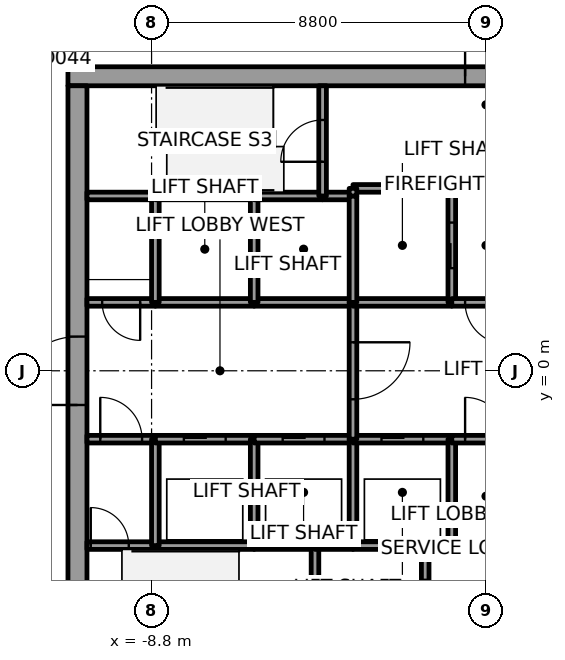
"""IFC4 building model, lengths in metres.
Left out: names, types, materials, properties, quantities, classifications, styles, units other than length and angle.
Written with IfcOpenShell. Run it as: python <this file> out.ifc"""

import sys

from ifc_helpers import new_model, si_unit, direction, frame, frame_2d, origin, place, context, subcontext, project, spatial, rectangle, extrude, element, fill, save


model = new_model("IFC4")
c1 = context("Model", 3, precision=1e-05, world=origin(), true_north=direction((0.0, 1.0)))
c2 = subcontext(c1, "Body", "Model", "MODEL_VIEW")
j1 = project(units=[si_unit("LENGTHUNIT", "METRE"), si_unit("PLANEANGLEUNIT", "RADIAN")], contexts=[c1])
p1 = place(None, origin())
s1 = spatial("IfcSite", under=j1, at=p1, CompositionType="ELEMENT")
p2 = place(p1, origin())
s2 = spatial("IfcBuilding", under=s1, at=p2, CompositionType="ELEMENT")
p3 = place(p2, frame((0.0, 0.0, 73.9)))
s3 = spatial("IfcBuildingStorey", under=s2, at=p3, CompositionType="ELEMENT", Elevation=73.9)
p4 = place(p3, frame((-11.0, 7.75, 0.0), z_axis=(0.0, 0.0, 1.0), x_axis=(1.0, 0.0, 0.0)))
e1 = element("IfcWall", 1, at=p4, inside=s3, PredefinedType="SHEAR", context=c2, shape_type="SweptSolid", body=[
    extrude(rectangle(XDim=22.0, YDim=0.5, at=frame_2d((11.0, 0.0))), origin(), (0.0, 0.0, 1.0), 3.7),
])
p5 = place(p4, frame((10.45, 0.0, 0.0)))
e2 = element("IfcOpeningElement", 2, at=p5, cuts=e1, PredefinedType="OPENING", context=c2, shape_type="SweptSolid", body=[
    extrude(rectangle(XDim=1.1, YDim=2.1, at=frame_2d((0.55, 1.05))), frame((0.0, 0.25, 0.0), z_axis=(0.0, -1.0, 0.0), x_axis=(1.0, 0.0, 0.0)), (0.0, 0.0, 1.0), 0.5),
])
p6 = place(p3, frame((-10.75, -7.5, 0.0), z_axis=(0.0, 0.0, 1.0), x_axis=(0.0, 1.0, 0.0)))
e3 = element("IfcWall", 3, at=p6, inside=s3, PredefinedType="SHEAR", context=c2, shape_type="SweptSolid", body=[
    extrude(rectangle(XDim=15.0, YDim=0.5, at=frame_2d((7.5, 0.0))), origin(), (0.0, 0.0, 1.0), 3.7),
])
p7 = place(p6, frame((6.6, 0.0, 0.0)))
e4 = element("IfcOpeningElement", 4, at=p7, cuts=e3, PredefinedType="OPENING", context=c2, shape_type="SweptSolid", body=[
    extrude(rectangle(XDim=1.8, YDim=2.1, at=frame_2d((0.9, 1.05))), frame((0.0, 0.25, 0.0), z_axis=(0.0, -1.0, 0.0), x_axis=(1.0, 0.0, 0.0)), (0.0, 0.0, 1.0), 0.5),
])
p8 = place(p3, frame((-10.5, -4.6, 0.0), z_axis=(0.0, 0.0, 1.0), x_axis=(1.0, 0.0, 0.0)))
e5 = element("IfcWall", 5, at=p8, inside=s3, PredefinedType="SOLIDWALL", context=c2, shape_type="SweptSolid", body=[
    extrude(rectangle(XDim=1.8, YDim=0.2, at=frame_2d((0.9, 0.0))), origin(), (0.0, 0.0, 1.0), 3.55),
])
p9 = place(p8, frame((0.1, 0.0, 0.0)))
e6 = element("IfcOpeningElement", 6, at=p9, cuts=e5, PredefinedType="OPENING", context=c2, shape_type="SweptSolid", body=[
    extrude(rectangle(XDim=1.0, YDim=2.1, at=frame_2d((0.5, 1.05))), frame((0.0, 0.1, 0.0), z_axis=(0.0, -1.0, 0.0), x_axis=(1.0, 0.0, 0.0)), (0.0, 0.0, 1.0), 0.2),
])
p10 = place(p3, frame((-10.5, -1.8, 0.0), z_axis=(0.0, 0.0, 1.0), x_axis=(1.0, 0.0, 0.0)))
e7 = element("IfcWall", 7, at=p10, inside=s3, PredefinedType="SOLIDWALL", context=c2, shape_type="SweptSolid", body=[
    extrude(rectangle(XDim=1.8, YDim=0.2, at=frame_2d((0.9, 0.0))), origin(), (0.0, 0.0, 1.0), 3.55),
])
p11 = place(p10, frame((0.35, 0.0, 0.0)))
e8 = element("IfcOpeningElement", 8, at=p11, cuts=e7, PredefinedType="OPENING", context=c2, shape_type="SweptSolid", body=[
    extrude(rectangle(XDim=1.1, YDim=2.1, at=frame_2d((0.55, 1.05))), frame((0.0, 0.1, 0.0), z_axis=(0.0, -1.0, 0.0), x_axis=(1.0, 0.0, 0.0)), (0.0, 0.0, 1.0), 0.2),
])
p12 = place(p3, frame((-8.7, 1.8, 0.0), z_axis=(0.0, 0.0, 1.0), x_axis=(-1.0, 0.0, 0.0)))
e9 = element("IfcWall", 9, at=p12, inside=s3, PredefinedType="SOLIDWALL", context=c2, shape_type="SweptSolid", body=[
    extrude(rectangle(XDim=1.8, YDim=0.2, at=frame_2d((0.9, 0.0))), origin(), (0.0, 0.0, 1.0), 3.55),
])
p13 = place(p12, frame((0.4, 0.0, 0.0)))
e10 = element("IfcOpeningElement", 10, at=p13, cuts=e9, PredefinedType="OPENING", context=c2, shape_type="SweptSolid", body=[
    extrude(rectangle(XDim=1.0, YDim=2.1, at=frame_2d((0.5, 1.05))), frame((0.0, 0.1, 0.0), z_axis=(0.0, -1.0, 0.0), x_axis=(1.0, 0.0, 0.0)), (0.0, 0.0, 1.0), 0.2),
])
p14 = place(p3, frame((-8.7, 4.6, 0.0), z_axis=(0.0, 0.0, 1.0), x_axis=(-1.0, 0.0, 0.0)))
e11 = element("IfcWall", 11, at=p14, inside=s3, PredefinedType="SOLIDWALL", context=c2, shape_type="SweptSolid", body=[
    extrude(rectangle(XDim=1.8, YDim=0.2, at=frame_2d((0.9, 0.0))), origin(), (0.0, 0.0, 1.0), 3.55),
])
p15 = place(p3, frame((-8.7, -4.6, 0.0), z_axis=(0.0, 0.0, 1.0), x_axis=(1.0, 0.0, 0.0)))
e12 = element("IfcWall", 12, at=p15, inside=s3, PredefinedType="SOLIDWALL", context=c2, shape_type="SweptSolid", body=[
    extrude(rectangle(XDim=2.6, YDim=0.2, at=frame_2d((1.3, 0.0))), origin(), (0.0, 0.0, 1.0), 3.55),
])
p16 = place(p3, frame((-8.7, -4.6, 0.0), z_axis=(0.0, 0.0, 1.0), x_axis=(0.0, 1.0, 0.0)))
e13 = element("IfcWall", 13, at=p16, inside=s3, PredefinedType="SOLIDWALL", context=c2, shape_type="SweptSolid", body=[
    extrude(rectangle(XDim=2.8, YDim=0.2, at=frame_2d((1.4, 0.0))), origin(), (0.0, 0.0, 1.0), 3.55),
])
p17 = place(p3, frame((-8.7, -1.8, 0.0), z_axis=(0.0, 0.0, 1.0), x_axis=(1.0, 0.0, 0.0)))
e14 = element("IfcWall", 14, at=p17, inside=s3, PredefinedType="SOLIDWALL", context=c2, shape_type="SweptSolid", body=[
    extrude(rectangle(XDim=2.6, YDim=0.2, at=frame_2d((1.3, 0.0))), origin(), (0.0, 0.0, 1.0), 3.55),
])
p18 = place(p17, frame((0.75, 0.0, 0.0)))
e15 = element("IfcOpeningElement", 15, at=p18, cuts=e14, PredefinedType="OPENING", context=c2, shape_type="SweptSolid", body=[
    extrude(rectangle(XDim=1.1, YDim=2.1, at=frame_2d((0.55, 1.05))), frame((0.0, 0.1, 0.0), z_axis=(0.0, -1.0, 0.0), x_axis=(1.0, 0.0, 0.0)), (0.0, 0.0, 1.0), 0.2),
])
p19 = place(p3, frame((-6.1, 1.8, 0.0), z_axis=(0.0, 0.0, 1.0), x_axis=(-1.0, 0.0, 0.0)))
e16 = element("IfcWall", 16, at=p19, inside=s3, PredefinedType="SOLIDWALL", context=c2, shape_type="SweptSolid", body=[
    extrude(rectangle(XDim=2.6, YDim=0.2, at=frame_2d((1.3, 0.0))), origin(), (0.0, 0.0, 1.0), 3.55),
])
p20 = place(p3, frame((-8.7, 1.8, 0.0), z_axis=(0.0, 0.0, 1.0), x_axis=(0.0, 1.0, 0.0)))
e17 = element("IfcWall", 17, at=p20, inside=s3, PredefinedType="SOLIDWALL", context=c2, shape_type="SweptSolid", body=[
    extrude(rectangle(XDim=2.8, YDim=0.2, at=frame_2d((1.4, 0.0))), origin(), (0.0, 0.0, 1.0), 3.55),
])
p21 = place(p3, frame((-6.1, 4.6, 0.0), z_axis=(0.0, 0.0, 1.0), x_axis=(-1.0, 0.0, 0.0)))
e18 = element("IfcWall", 18, at=p21, inside=s3, PredefinedType="SOLIDWALL", context=c2, shape_type="SweptSolid", body=[
    extrude(rectangle(XDim=2.6, YDim=0.2, at=frame_2d((1.3, 0.0))), origin(), (0.0, 0.0, 1.0), 3.55),
])
p22 = place(p3, frame((-6.1, -4.6, 0.0), z_axis=(0.0, 0.0, 1.0), x_axis=(1.0, 0.0, 0.0)))
e19 = element("IfcWall", 19, at=p22, inside=s3, PredefinedType="SOLIDWALL", context=c2, shape_type="SweptSolid", body=[
    extrude(rectangle(XDim=1.6, YDim=0.2, at=frame_2d((0.8, 0.0))), origin(), (0.0, 0.0, 1.0), 3.55),
])
p23 = place(p3, frame((-6.1, -4.6, 0.0), z_axis=(0.0, 0.0, 1.0), x_axis=(0.0, 1.0, 0.0)))
e20 = element("IfcWall", 20, at=p23, inside=s3, PredefinedType="SOLIDWALL", context=c2, shape_type="SweptSolid", body=[
    extrude(rectangle(XDim=2.8, YDim=0.2, at=frame_2d((1.4, 0.0))), origin(), (0.0, 0.0, 1.0), 3.55),
])
p24 = place(p3, frame((-6.1, -1.8, 0.0), z_axis=(0.0, 0.0, 1.0), x_axis=(1.0, 0.0, 0.0)))
e21 = element("IfcWall", 21, at=p24, inside=s3, PredefinedType="SOLIDWALL", context=c2, shape_type="SweptSolid", body=[
    extrude(rectangle(XDim=2.6, YDim=0.2, at=frame_2d((1.3, 0.0))), origin(), (0.0, 0.0, 1.0), 3.55),
])
p25 = place(p24, frame((0.75, 0.0, 0.0)))
e22 = element("IfcOpeningElement", 22, at=p25, cuts=e21, PredefinedType="OPENING", context=c2, shape_type="SweptSolid", body=[
    extrude(rectangle(XDim=1.1, YDim=2.1, at=frame_2d((0.55, 1.05))), frame((0.0, 0.1, 0.0), z_axis=(0.0, -1.0, 0.0), x_axis=(1.0, 0.0, 0.0)), (0.0, 0.0, 1.0), 0.2),
])
p26 = place(p3, frame((-3.5, 1.8, 0.0), z_axis=(0.0, 0.0, 1.0), x_axis=(-1.0, 0.0, 0.0)))
e23 = element("IfcWall", 23, at=p26, inside=s3, PredefinedType="SOLIDWALL", context=c2, shape_type="SweptSolid", body=[
    extrude(rectangle(XDim=2.6, YDim=0.2, at=frame_2d((1.3, 0.0))), origin(), (0.0, 0.0, 1.0), 3.55),
])
p27 = place(p3, frame((-6.1, 1.8, 0.0), z_axis=(0.0, 0.0, 1.0), x_axis=(0.0, 1.0, 0.0)))
e24 = element("IfcWall", 24, at=p27, inside=s3, PredefinedType="SOLIDWALL", context=c2, shape_type="SweptSolid", body=[
    extrude(rectangle(XDim=2.8, YDim=0.2, at=frame_2d((1.4, 0.0))), origin(), (0.0, 0.0, 1.0), 3.55),
])
p28 = place(p3, frame((-4.3, 4.6, 0.0), z_axis=(0.0, 0.0, 1.0), x_axis=(-1.0, 0.0, 0.0)))
e25 = element("IfcWall", 25, at=p28, inside=s3, PredefinedType="SOLIDWALL", context=c2, shape_type="SweptSolid", body=[
    extrude(rectangle(XDim=1.8, YDim=0.2, at=frame_2d((0.9, 0.0))), origin(), (0.0, 0.0, 1.0), 3.55),
])
p29 = place(p3, frame((-4.5, -4.6, 0.0), z_axis=(0.0, 0.0, 1.0), x_axis=(0.0, -1.0, 0.0)))
e26 = element("IfcWall", 26, at=p29, inside=s3, PredefinedType="SOLIDWALL", context=c2, shape_type="SweptSolid", body=[
    extrude(rectangle(XDim=2.9, YDim=0.2, at=frame_2d((1.45, 0.0))), origin(), (0.0, 0.0, 1.0), 3.55),
])
p30 = place(p3, frame((-4.5, -4.6, 0.0), z_axis=(0.0, 0.0, 1.0), x_axis=(1.0, 0.0, 0.0)))
e27 = element("IfcWall", 27, at=p30, inside=s3, PredefinedType="SOLIDWALL", context=c2, shape_type="SweptSolid", body=[
    extrude(rectangle(XDim=1.0, YDim=0.2, at=frame_2d((0.5, 0.0))), origin(), (0.0, 0.0, 1.0), 3.55),
])
p31 = place(p3, frame((-3.5, 4.6, 0.0), z_axis=(0.0, 0.0, 1.0), x_axis=(-1.0, 0.0, 0.0)))
e28 = element("IfcWall", 28, at=p31, inside=s3, PredefinedType="SOLIDWALL", context=c2, shape_type="SweptSolid", body=[
    extrude(rectangle(XDim=0.8, YDim=0.2, at=frame_2d((0.4, 0.0))), origin(), (0.0, 0.0, 1.0), 3.55),
])
p32 = place(p3, frame((-4.3, 4.6, 0.0), z_axis=(0.0, 0.0, 1.0), x_axis=(0.0, 1.0, 0.0)))
e29 = element("IfcWall", 29, at=p32, inside=s3, PredefinedType="SOLIDWALL", context=c2, shape_type="SweptSolid", body=[
    extrude(rectangle(XDim=2.9, YDim=0.2, at=frame_2d((1.45, 0.0))), origin(), (0.0, 0.0, 1.0), 3.55),
])
p33 = place(p32, frame((0.9, 0.0, 0.0)))
e30 = element("IfcOpeningElement", 30, at=p33, cuts=e29, PredefinedType="OPENING", context=c2, shape_type="SweptSolid", body=[
    extrude(rectangle(XDim=1.1, YDim=2.1, at=frame_2d((0.55, 1.05))), frame((0.0, 0.1, 0.0), z_axis=(0.0, -1.0, 0.0), x_axis=(1.0, 0.0, 0.0)), (0.0, 0.0, 1.0), 0.2),
])
p34 = place(p3, frame((-3.5, -4.6, 0.0), z_axis=(0.0, 0.0, 1.0), x_axis=(1.0, 0.0, 0.0)))
e31 = element("IfcWall", 31, at=p34, inside=s3, PredefinedType="SOLIDWALL", context=c2, shape_type="SweptSolid", body=[
    extrude(rectangle(XDim=1.9, YDim=0.2, at=frame_2d((0.95, 0.0))), origin(), (0.0, 0.0, 1.0), 3.55),
])
p35 = place(p3, frame((-3.5, -4.6, 0.0), z_axis=(0.0, 0.0, 1.0), x_axis=(0.0, 1.0, 0.0)))
e32 = element("IfcWall", 32, at=p35, inside=s3, PredefinedType="SOLIDWALL", context=c2, shape_type="SweptSolid", body=[
    extrude(rectangle(XDim=2.8, YDim=0.2, at=frame_2d((1.4, 0.0))), origin(), (0.0, 0.0, 1.0), 3.55),
])
p36 = place(p3, frame((-3.5, -1.8, 0.0), z_axis=(0.0, 0.0, 1.0), x_axis=(1.0, 0.0, 0.0)))
e33 = element("IfcWall", 33, at=p36, inside=s3, PredefinedType="SOLIDWALL", context=c2, shape_type="SweptSolid", body=[
    extrude(rectangle(XDim=2.6, YDim=0.2, at=frame_2d((1.3, 0.0))), origin(), (0.0, 0.0, 1.0), 3.55),
])
p37 = place(p36, frame((0.75, 0.0, 0.0)))
e34 = element("IfcOpeningElement", 34, at=p37, cuts=e33, PredefinedType="OPENING", context=c2, shape_type="SweptSolid", body=[
    extrude(rectangle(XDim=1.1, YDim=2.1, at=frame_2d((0.55, 1.05))), frame((0.0, 0.1, 0.0), z_axis=(0.0, -1.0, 0.0), x_axis=(1.0, 0.0, 0.0)), (0.0, 0.0, 1.0), 0.2),
])
p38 = place(p3, frame((-3.5, 1.8, 0.0), z_axis=(0.0, 0.0, 1.0), x_axis=(0.0, -1.0, 0.0)))
e35 = element("IfcWall", 35, at=p38, inside=s3, PredefinedType="SOLIDWALL", context=c2, shape_type="SweptSolid", body=[
    extrude(rectangle(XDim=3.6, YDim=0.2, at=frame_2d((1.8, 0.0))), origin(), (0.0, 0.0, 1.0), 3.55),
])
p39 = place(p38, frame((1.05, 0.0, 0.0)))
e36 = element("IfcOpeningElement", 36, at=p39, cuts=e35, PredefinedType="OPENING", context=c2, shape_type="SweptSolid", body=[
    extrude(rectangle(XDim=1.5, YDim=2.1, at=frame_2d((0.75, 1.05))), frame((0.0, 0.1, 0.0), z_axis=(0.0, -1.0, 0.0), x_axis=(1.0, 0.0, 0.0)), (0.0, 0.0, 1.0), 0.2),
])
p40 = place(p3, frame((-0.9, 1.8, 0.0), z_axis=(0.0, 0.0, 1.0), x_axis=(-1.0, 0.0, 0.0)))
e37 = element("IfcWall", 37, at=p40, inside=s3, PredefinedType="SOLIDWALL", context=c2, shape_type="SweptSolid", body=[
    extrude(rectangle(XDim=2.6, YDim=0.2, at=frame_2d((1.3, 0.0))), origin(), (0.0, 0.0, 1.0), 3.55),
])
p41 = place(p3, frame((-3.5, 4.6, 0.0), z_axis=(0.0, 0.0, 1.0), x_axis=(0.0, -1.0, 0.0)))
e38 = element("IfcWall", 38, at=p41, inside=s3, PredefinedType="SOLIDWALL", context=c2, shape_type="SweptSolid", body=[
    extrude(rectangle(XDim=2.8, YDim=0.2, at=frame_2d((1.4, 0.0))), origin(), (0.0, 0.0, 1.0), 3.55),
])
p42 = place(p3, frame((-0.9, 1.8, 0.0), z_axis=(0.0, 0.0, 1.0), x_axis=(0.0, 1.0, 0.0)))
e39 = element("IfcWall", 39, at=p42, inside=s3, PredefinedType="SOLIDWALL", context=c2, shape_type="SweptSolid", body=[
    extrude(rectangle(XDim=3.0, YDim=0.2, at=frame_2d((1.5, 0.0))), origin(), (0.0, 0.0, 1.0), 3.55),
])
p43 = place(p42, frame((0.9, 0.0, 0.0)))
e40 = element("IfcOpeningElement", 40, at=p43, cuts=e39, PredefinedType="OPENING", context=c2, shape_type="SweptSolid", body=[
    extrude(rectangle(XDim=1.2, YDim=2.1, at=frame_2d((0.6, 1.05))), frame((0.0, 0.1, 0.0), z_axis=(0.0, -1.0, 0.0), x_axis=(1.0, 0.0, 0.0)), (0.0, 0.0, 1.0), 0.2),
])
p44 = place(p3, frame((-0.9, 4.8, 0.0), z_axis=(0.0, 0.0, 1.0), x_axis=(-1.0, 0.0, 0.0)))
e41 = element("IfcWall", 41, at=p44, inside=s3, PredefinedType="SOLIDWALL", context=c2, shape_type="SweptSolid", body=[
    extrude(rectangle(XDim=2.6, YDim=0.2, at=frame_2d((1.3, 0.0))), origin(), (0.0, 0.0, 1.0), 3.55),
])
p45 = place(p3, frame((-3.5, 4.8, 0.0), z_axis=(0.0, 0.0, 1.0), x_axis=(0.0, -1.0, 0.0)))
e42 = element("IfcWall", 42, at=p45, inside=s3, PredefinedType="SOLIDWALL", context=c2, shape_type="SweptSolid", body=[
    extrude(rectangle(XDim=0.2, YDim=0.2, at=frame_2d((0.1, 0.0))), origin(), (0.0, 0.0, 1.0), 3.55),
])
p46 = place(p3, frame((-1.6, -7.5, 0.0), z_axis=(0.0, 0.0, 1.0), x_axis=(0.0, 1.0, 0.0)))
e43 = element("IfcWall", 43, at=p46, inside=s3, PredefinedType="SOLIDWALL", context=c2, shape_type="SweptSolid", body=[
    extrude(rectangle(XDim=2.9, YDim=0.2, at=frame_2d((1.45, 0.0))), origin(), (0.0, 0.0, 1.0), 3.55),
])
p47 = place(p46, frame((0.9, 0.0, 0.0)))
e44 = element("IfcOpeningElement", 44, at=p47, cuts=e43, PredefinedType="OPENING", context=c2, shape_type="SweptSolid", body=[
    extrude(rectangle(XDim=1.1, YDim=2.1, at=frame_2d((0.55, 1.05))), frame((0.0, 0.1, 0.0), z_axis=(0.0, -1.0, 0.0), x_axis=(1.0, 0.0, 0.0)), (0.0, 0.0, 1.0), 0.2),
])
p48 = place(p3, frame((-1.6, -4.6, 0.0), z_axis=(0.0, 0.0, 1.0), x_axis=(1.0, 0.0, 0.0)))
e45 = element("IfcWall", 45, at=p48, inside=s3, PredefinedType="SOLIDWALL", context=c2, shape_type="SweptSolid", body=[
    extrude(rectangle(XDim=0.7, YDim=0.2, at=frame_2d((0.35, 0.0))), origin(), (0.0, 0.0, 1.0), 3.55),
])
p49 = place(p3, frame((-0.9, -4.6, 0.0), z_axis=(0.0, 0.0, 1.0), x_axis=(0.0, 1.0, 0.0)))
e46 = element("IfcWall", 46, at=p49, inside=s3, PredefinedType="SOLIDWALL", context=c2, shape_type="SweptSolid", body=[
    extrude(rectangle(XDim=2.8, YDim=0.2, at=frame_2d((1.4, 0.0))), origin(), (0.0, 0.0, 1.0), 3.55),
])
p50 = place(p3, frame((-0.9, -1.8, 0.0), z_axis=(0.0, 0.0, 1.0), x_axis=(1.0, 0.0, 0.0)))
e47 = element("IfcWall", 47, at=p50, inside=s3, PredefinedType="SOLIDWALL", context=c2, shape_type="SweptSolid", body=[
    extrude(rectangle(XDim=1.8, YDim=0.2, at=frame_2d((0.9, 0.0))), origin(), (0.0, 0.0, 1.0), 3.55),
])
p51 = place(p50, frame((0.35, 0.0, 0.0)))
e48 = element("IfcOpeningElement", 48, at=p51, cuts=e47, PredefinedType="OPENING", context=c2, shape_type="SweptSolid", body=[
    extrude(rectangle(XDim=1.1, YDim=2.1, at=frame_2d((0.55, 1.05))), frame((0.0, 0.1, 0.0), z_axis=(0.0, -1.0, 0.0), x_axis=(1.0, 0.0, 0.0)), (0.0, 0.0, 1.0), 0.2),
])
p52 = place(p3, frame((0.9, 1.8, 0.0), z_axis=(0.0, 0.0, 1.0), x_axis=(-1.0, 0.0, 0.0)))
e49 = element("IfcWall", 49, at=p52, inside=s3, PredefinedType="SOLIDWALL", context=c2, shape_type="SweptSolid", body=[
    extrude(rectangle(XDim=1.8, YDim=0.2, at=frame_2d((0.9, 0.0))), origin(), (0.0, 0.0, 1.0), 3.55),
])
p53 = place(p52, frame((0.35, 0.0, 0.0)))
e50 = element("IfcOpeningElement", 50, at=p53, cuts=e49, PredefinedType="OPENING", context=c2, shape_type="SweptSolid", body=[
    extrude(rectangle(XDim=1.1, YDim=2.1, at=frame_2d((0.55, 1.05))), frame((0.0, 0.1, 0.0), z_axis=(0.0, -1.0, 0.0), x_axis=(1.0, 0.0, 0.0)), (0.0, 0.0, 1.0), 0.2),
])
p54 = place(p18, origin())
e51 = element("IfcDoor", 51, at=p54, inside=s3, OperationType="SLIDING_TO_LEFT", PredefinedType="DOOR", context=c2, shape_type="SweptSolid", body=[
    extrude(rectangle(XDim=1.1, YDim=2.1, at=frame_2d((0.55, 1.05))), frame((0.0, 0.025, 0.0), z_axis=(0.0, -1.0, 0.0), x_axis=(1.0, 0.0, 0.0)), (0.0, 0.0, 1.0), 0.05),
])
fill(e15, e51)
p55 = place(p25, origin())
e52 = element("IfcDoor", 52, at=p55, inside=s3, OperationType="SLIDING_TO_LEFT", PredefinedType="DOOR", context=c2, shape_type="SweptSolid", body=[
    extrude(rectangle(XDim=1.1, YDim=2.1, at=frame_2d((0.55, 1.05))), frame((0.0, 0.025, 0.0), z_axis=(0.0, -1.0, 0.0), x_axis=(1.0, 0.0, 0.0)), (0.0, 0.0, 1.0), 0.05),
])
fill(e22, e52)
p56 = place(p37, origin())
e53 = element("IfcDoor", 53, at=p56, inside=s3, OperationType="SLIDING_TO_LEFT", PredefinedType="DOOR", context=c2, shape_type="SweptSolid", body=[
    extrude(rectangle(XDim=1.1, YDim=2.1, at=frame_2d((0.55, 1.05))), frame((0.0, 0.025, 0.0), z_axis=(0.0, -1.0, 0.0), x_axis=(1.0, 0.0, 0.0)), (0.0, 0.0, 1.0), 0.05),
])
fill(e34, e53)
p57 = place(p43, origin())
e54 = element("IfcDoor", 54, at=p57, inside=s3, OperationType="SLIDING_TO_RIGHT", PredefinedType="DOOR", context=c2, shape_type="SweptSolid", body=[
    extrude(rectangle(XDim=1.2, YDim=2.1, at=frame_2d((0.6, 1.05))), frame((0.0, 0.025, 0.0), z_axis=(0.0, -1.0, 0.0), x_axis=(1.0, 0.0, 0.0)), (0.0, 0.0, 1.0), 0.05),
])
fill(e40, e54)
p58 = place(p39, origin())
e55 = element("IfcDoor", 55, at=p58, inside=s3, OperationType="DOUBLE_DOOR_SINGLE_SWING", PredefinedType="DOOR", context=c2, shape_type="SweptSolid", body=[
    extrude(rectangle(XDim=1.5, YDim=2.1, at=frame_2d((0.75, 1.05))), frame((0.0, 0.025, 0.0), z_axis=(0.0, -1.0, 0.0), x_axis=(1.0, 0.0, 0.0)), (0.0, 0.0, 1.0), 0.05),
])
fill(e36, e55)
p59 = place(p11, origin())
e56 = element("IfcDoor", 56, at=p59, inside=s3, OperationType="SINGLE_SWING_LEFT", PredefinedType="DOOR", context=c2, shape_type="SweptSolid", body=[
    extrude(rectangle(XDim=1.1, YDim=2.1, at=frame_2d((0.55, 1.05))), frame((0.0, 0.025, 0.0), z_axis=(0.0, -1.0, 0.0), x_axis=(1.0, 0.0, 0.0)), (0.0, 0.0, 1.0), 0.05),
])
fill(e8, e56)
p60 = place(p53, origin())
e57 = element("IfcDoor", 57, at=p60, inside=s3, OperationType="SINGLE_SWING_RIGHT", PredefinedType="DOOR", context=c2, shape_type="SweptSolid", body=[
    extrude(rectangle(XDim=1.1, YDim=2.1, at=frame_2d((0.55, 1.05))), frame((0.0, 0.025, 0.0), z_axis=(0.0, -1.0, 0.0), x_axis=(1.0, 0.0, 0.0)), (0.0, 0.0, 1.0), 0.05),
])
fill(e50, e57)
p61 = place(p51, origin())
e58 = element("IfcDoor", 58, at=p61, inside=s3, OperationType="SINGLE_SWING_RIGHT", PredefinedType="DOOR", context=c2, shape_type="SweptSolid", body=[
    extrude(rectangle(XDim=1.1, YDim=2.1, at=frame_2d((0.55, 1.05))), frame((0.0, 0.025, 0.0), z_axis=(0.0, -1.0, 0.0), x_axis=(1.0, 0.0, 0.0)), (0.0, 0.0, 1.0), 0.05),
])
fill(e48, e58)
p62 = place(p13, origin())
e59 = element("IfcDoor", 59, at=p62, inside=s3, OperationType="SINGLE_SWING_RIGHT", PredefinedType="DOOR", context=c2, shape_type="SweptSolid", body=[
    extrude(rectangle(XDim=1.0, YDim=2.1, at=frame_2d((0.5, 1.05))), frame((0.0, 0.025, 0.0), z_axis=(0.0, -1.0, 0.0), x_axis=(1.0, 0.0, 0.0)), (0.0, 0.0, 1.0), 0.05),
])
fill(e10, e59)
p63 = place(p9, origin())
e60 = element("IfcDoor", 60, at=p63, inside=s3, OperationType="SINGLE_SWING_LEFT", PredefinedType="DOOR", context=c2, shape_type="SweptSolid", body=[
    extrude(rectangle(XDim=1.0, YDim=2.1, at=frame_2d((0.5, 1.05))), frame((0.0, 0.025, 0.0), z_axis=(0.0, -1.0, 0.0), x_axis=(1.0, 0.0, 0.0)), (0.0, 0.0, 1.0), 0.05),
])
fill(e6, e60)
p64 = place(p33, origin())
e61 = element("IfcDoor", 61, at=p64, inside=s3, OperationType="SINGLE_SWING_RIGHT", PredefinedType="DOOR", context=c2, shape_type="SweptSolid", body=[
    extrude(rectangle(XDim=1.1, YDim=2.1, at=frame_2d((0.55, 1.05))), frame((0.0, 0.025, 0.0), z_axis=(0.0, -1.0, 0.0), x_axis=(1.0, 0.0, 0.0)), (0.0, 0.0, 1.0), 0.05),
])
fill(e30, e61)
p65 = place(p7, origin())
e62 = element("IfcDoor", 62, at=p65, inside=s3, OperationType="DOUBLE_DOOR_SINGLE_SWING", PredefinedType="DOOR", context=c2, shape_type="SweptSolid", body=[
    extrude(rectangle(XDim=1.8, YDim=2.1, at=frame_2d((0.9, 1.05))), frame((0.0, 0.025, 0.0), z_axis=(0.0, -1.0, 0.0), x_axis=(1.0, 0.0, 0.0)), (0.0, 0.0, 1.0), 0.05),
])
fill(e4, e62)
p66 = place(p5, origin())
e63 = element("IfcDoor", 63, at=p66, inside=s3, OperationType="SINGLE_SWING_RIGHT", PredefinedType="DOOR", context=c2, shape_type="SweptSolid", body=[
    extrude(rectangle(XDim=1.1, YDim=2.1, at=frame_2d((0.55, 1.05))), frame((0.0, 0.025, 0.0), z_axis=(0.0, -1.0, 0.0), x_axis=(1.0, 0.0, 0.0)), (0.0, 0.0, 1.0), 0.05),
])
fill(e2, e63)
save(model, sys.argv[1])
